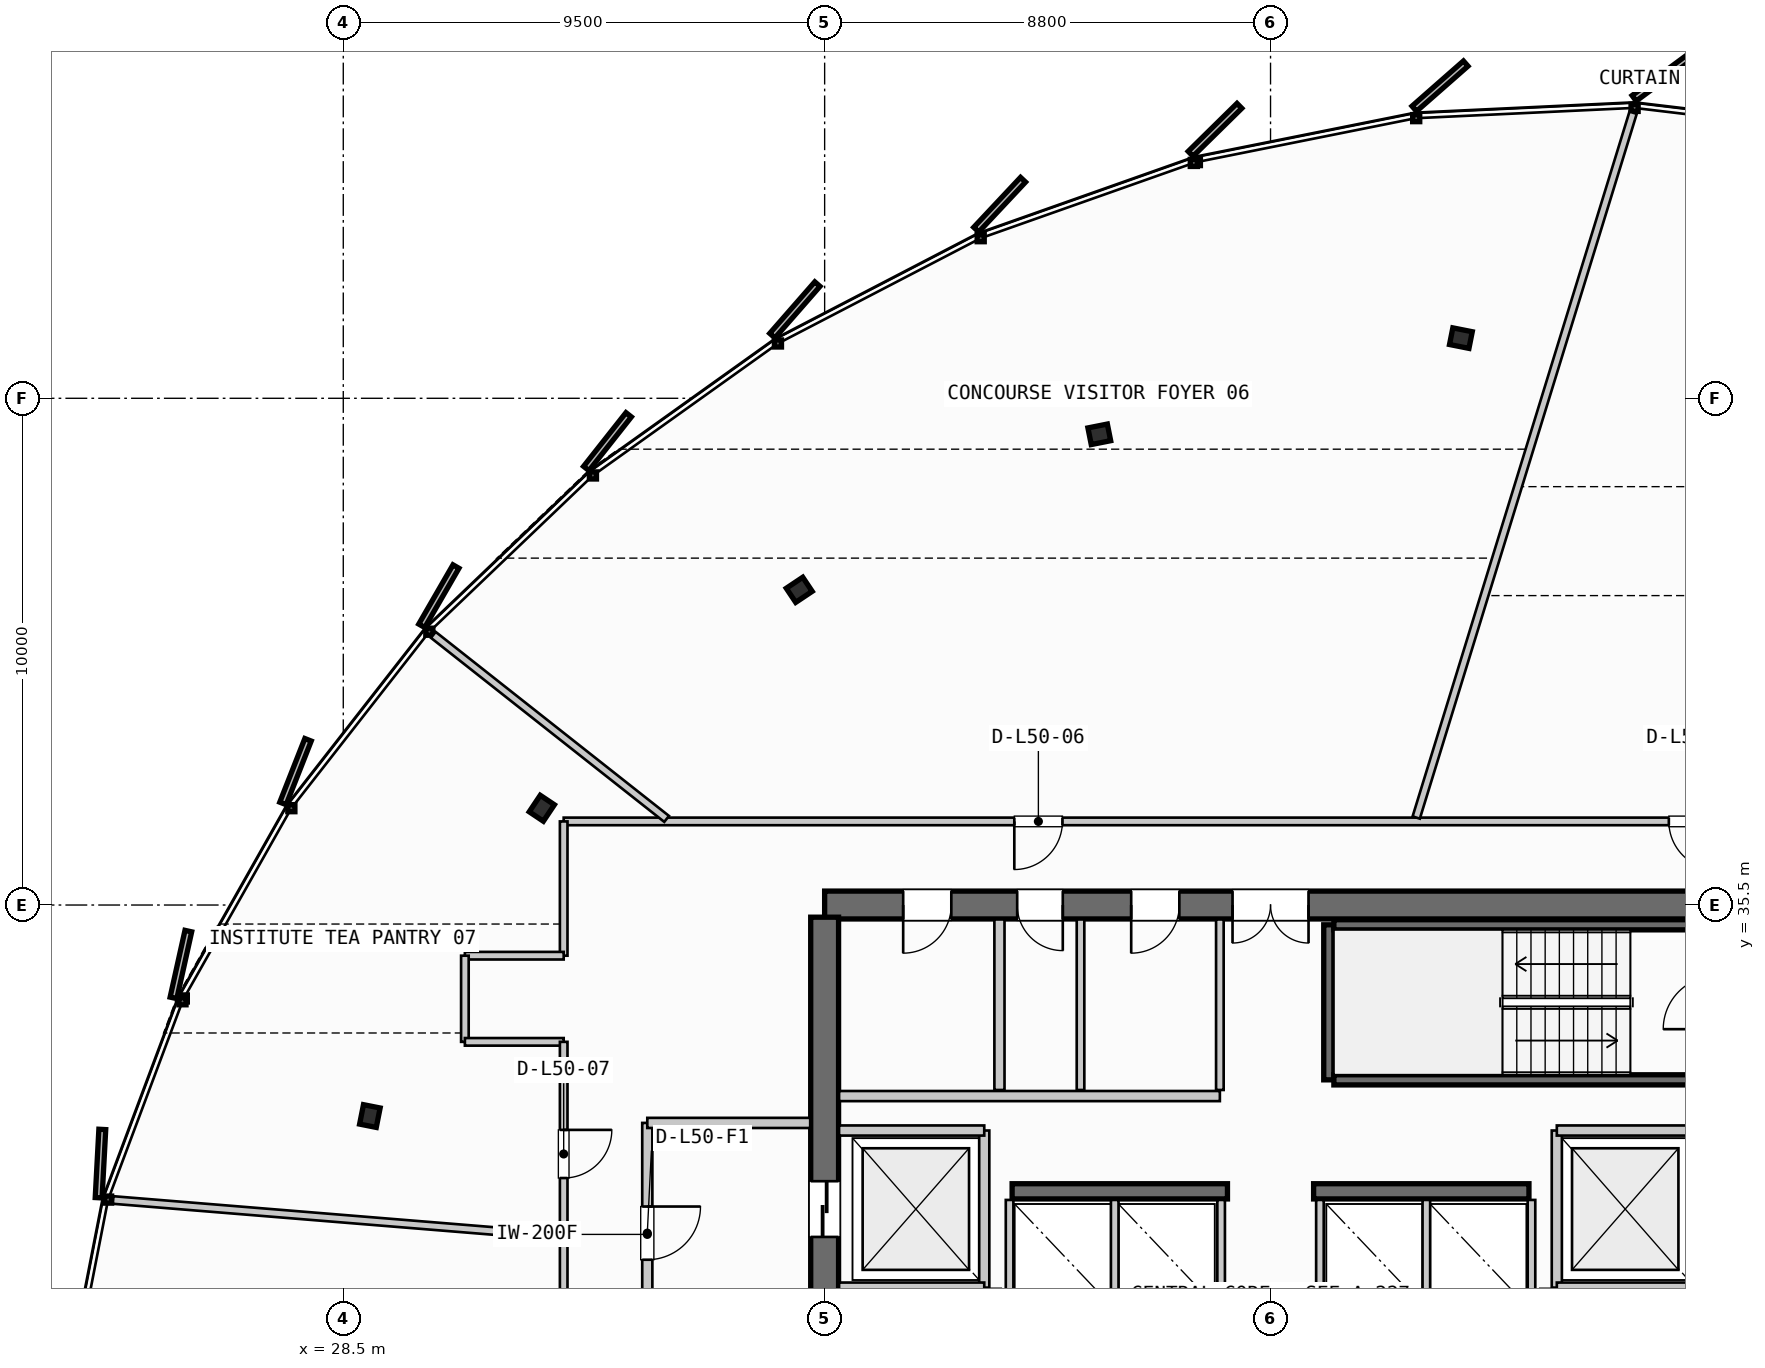
"""IFC4 building model, lengths in metres.
Left out: names, types, materials, properties, quantities, classifications, styles, units other than length and angle.
Written with IfcOpenShell. Run it as: python <this file> out.ifc"""

import sys

from ifc_helpers import new_model, si_unit, direction, frame, frame_2d, origin, origin_2d, place, context, subcontext, project, spatial, rectangle, i_section, extrude, source, transform, mapped, element, fill, save


model = new_model("IFC4")
c1 = context("Model", 3, precision=1e-05, world=origin(), true_north=direction((0.0, 1.0)))
c2 = subcontext(c1, "Body", "Model", "MODEL_VIEW")
j1 = project(units=[si_unit("LENGTHUNIT", "METRE"), si_unit("PLANEANGLEUNIT", "RADIAN")], contexts=[c1])
p1 = place(None, origin())
s1 = spatial("IfcSite", under=j1, at=p1, CompositionType="ELEMENT")
p2 = place(p1, origin())
s2 = spatial("IfcBuilding", under=s1, at=p2, CompositionType="ELEMENT")
p3 = place(p2, frame((0.0, 0.0, 193.9)))
s3 = spatial("IfcBuildingStorey", under=s2, at=p3, CompositionType="ELEMENT", Elevation=193.9)
p4 = place(p3, frame((55.6, 35.5, 0.0), z_axis=(0.0, 0.0, 1.0), x_axis=(-1.0, 0.0, 0.0)))
e1 = element("IfcWall", 1, at=p4, inside=s3, PredefinedType="SHEAR", context=c2, shape_type="SweptSolid", body=[
    extrude(rectangle(XDim=17.6, YDim=0.55, at=frame_2d((8.8, 0.0))), origin(), (0.0, 0.0, 1.0), 3.26),
])
p5 = place(p4, frame((8.05, 0.0, 0.0)))
e2 = element("IfcOpeningElement", 2, at=p5, cuts=e1, PredefinedType="OPENING", context=c2, shape_type="SweptSolid", body=[
    extrude(rectangle(XDim=1.5, YDim=2.2, at=frame_2d((0.75, 1.1))), frame((0.0, 0.285, 0.0), z_axis=(0.0, -1.0, 0.0), x_axis=(1.0, 0.0, 0.0)), (0.0, 0.0, 1.0), 0.57),
])
p6 = place(p4, frame((15.1, 0.0, 0.0)))
e3 = element("IfcOpeningElement", 3, at=p6, cuts=e1, PredefinedType="OPENING", context=c2, shape_type="SweptSolid", body=[
    extrude(rectangle(XDim=0.95, YDim=2.15, at=frame_2d((0.475, 1.075))), frame((0.0, 0.285, 0.0), z_axis=(0.0, -1.0, 0.0), x_axis=(1.0, 0.0, 0.0)), (0.0, 0.0, 1.0), 0.57),
])
p7 = place(p4, frame((12.9, 0.0, 0.0)))
e4 = element("IfcOpeningElement", 4, at=p7, cuts=e1, PredefinedType="OPENING", context=c2, shape_type="SweptSolid", body=[
    extrude(rectangle(XDim=0.9, YDim=2.15, at=frame_2d((0.45, 1.075))), frame((0.0, 0.285, 0.0), z_axis=(0.0, -1.0, 0.0), x_axis=(1.0, 0.0, 0.0)), (0.0, 0.0, 1.0), 0.57),
])
p8 = place(p4, frame((10.6, 0.0, 0.0)))
e5 = element("IfcOpeningElement", 5, at=p8, cuts=e1, PredefinedType="OPENING", context=c2, shape_type="SweptSolid", body=[
    extrude(rectangle(XDim=0.95, YDim=2.15, at=frame_2d((0.475, 1.075))), frame((0.0, 0.285, 0.0), z_axis=(0.0, -1.0, 0.0), x_axis=(1.0, 0.0, 0.0)), (0.0, 0.0, 1.0), 0.57),
])
p9 = place(p3, frame((38.0, 35.26, 0.0), z_axis=(0.0, 0.0, 1.0), x_axis=(0.0, -1.0, 0.0)))
e6 = element("IfcWall", 6, at=p9, inside=s3, PredefinedType="SHEAR", context=c2, shape_type="SweptSolid", body=[
    extrude(rectangle(XDim=14.92, YDim=0.55, at=frame_2d((7.46, 0.0))), origin(), (0.0, 0.0, 1.0), 3.26),
])
p10 = place(p9, frame((5.21, 0.0, 0.0)))
e7 = element("IfcOpeningElement", 7, at=p10, cuts=e6, PredefinedType="OPENING", context=c2, shape_type="SweptSolid", body=[
    extrude(rectangle(XDim=1.1, YDim=2.2, at=frame_2d((0.55, 1.1))), frame((0.0, 0.285, 0.0), z_axis=(0.0, -1.0, 0.0), x_axis=(1.0, 0.0, 0.0)), (0.0, 0.0, 1.0), 0.57),
])
for number, where, z_axis, x_axis in (
    (8, (41.7, 29.85, 0.0), (0.0, 0.0, 1.0), (1.0, 0.0, 0.0)),
    (9, (47.65, 29.85, 0.0), (0.0, 0.0, 1.0), (1.0, 0.0, 0.0)),
):
    element("IfcWall", number, at=place(p3, frame(where, z_axis=z_axis, x_axis=x_axis)), inside=s3, PredefinedType="SHEAR", context=c2, shape_type="SweptSolid", body=[
        extrude(rectangle(XDim=4.25, YDim=0.3, at=frame_2d((2.125, 0.0))), origin(), (0.0, 0.0, 1.0), 3.26),
    ])
m1 = source(origin(), c2, "Body", "SweptSolid", [
    extrude(i_section(OverallWidth=0.391, OverallDepth=0.335, WebThickness=0.023, FlangeThickness=0.034, FilletRadius=0.015, at=origin_2d()), origin(), (0.0, 0.0, 1.0), 3.26),
])
for number, where, z_axis, x_axis in (
    (10, (50.557, 46.688, 0.0), (0.0, 0.0, 1.0), (0.195, 0.981, 0.0)),
    (11, (43.421, 44.789, 0.0), (0.0, 0.0, 1.0), (-0.195, 0.981, 0.0)),
    (12, (37.499, 41.72, 0.0), (0.0, 0.0, 1.0), (-0.556, 0.831, 0.0)),
    (13, (32.418, 37.409, 0.0), (0.0, 0.0, 1.0), (-0.831, 0.556, 0.0)),
    (14, (29.025, 31.336, 0.0), (0.0, 0.0, 1.0), (-0.981, 0.195, 0.0)),
):
    element("IfcColumn", number, at=place(p3, frame(where, z_axis=z_axis, x_axis=x_axis)), inside=s3, PredefinedType="COLUMN", context=c2, shape_type="MappedRepresentation", body=[
        mapped(m1, transform((0.0, 0.0, 0.0), scale=1.0)),
    ])
p11 = place(p3, frame((47.95, 32.05, 0.0), z_axis=(0.0, 0.0, 1.0), x_axis=(0.0, 1.0, 0.0)))
e15 = element("IfcWall", 15, at=p11, inside=s3, PredefinedType="SHEAR", context=c2, shape_type="SweptSolid", body=[
    extrude(rectangle(XDim=3.06, YDim=0.2, at=frame_2d((1.53, 0.0))), origin(), (0.0, 0.0, 1.0), 3.26),
])
for number, where, z_axis, x_axis in (
    (16, (48.05, 35.11, 0.0), (0.0, 0.0, 1.0), (1.0, 0.0, 0.0)),
    (17, (55.4, 32.05, 0.0), (0.0, 0.0, 1.0), (-1.0, 0.0, 0.0)),
):
    element("IfcWall", number, at=place(p3, frame(where, z_axis=z_axis, x_axis=x_axis)), inside=s3, PredefinedType="SHEAR", context=c2, shape_type="SweptSolid", body=[
        extrude(rectangle(XDim=7.35, YDim=0.2, at=frame_2d((3.675, 0.0))), origin(), (0.0, 0.0, 1.0), 3.26),
    ])
p12 = place(p3, frame((41.15, 27.95, 0.0), z_axis=(0.0, 0.0, 1.0), x_axis=(0.0, 1.0, 0.0)))
e18 = element("IfcWall", 18, at=p12, inside=s3, PredefinedType="PARTITIONING", context=c2, shape_type="SweptSolid", body=[
    extrude(rectangle(XDim=3.1, YDim=0.2, at=frame_2d((1.55, 0.0))), origin(), (0.0, 0.0, 1.0), 2.735),
])
for number, where, z_axis, x_axis in (
    (19, (38.285, 27.95, 0.0), (0.0, 0.0, 1.0), (1.0, 0.0, 0.0)),
    (20, (38.285, 31.05, 0.0), (0.0, 0.0, 1.0), (1.0, 0.0, 0.0)),
):
    element("IfcWall", number, at=place(p3, frame(where, z_axis=z_axis, x_axis=x_axis)), inside=s3, PredefinedType="PARTITIONING", context=c2, shape_type="SweptSolid", body=[
        extrude(rectangle(XDim=2.865, YDim=0.2, at=frame_2d((1.433, 0.0))), origin(), (0.0, 0.0, 1.0), 2.735),
    ])
p13 = place(p3, frame((34.5, 31.2, 0.0), z_axis=(0.0, 0.0, 1.0), x_axis=(0.0, -1.0, 0.0)))
e21 = element("IfcWall", 21, at=p13, inside=s3, PredefinedType="PARTITIONING", context=c2, shape_type="SweptSolid", body=[
    extrude(rectangle(XDim=4.4, YDim=0.2, at=frame_2d((2.2, 0.0))), origin(), (0.0, 0.0, 1.0), 2.735),
])
p14 = place(p13, frame((1.65, 0.0, 0.0)))
e22 = element("IfcOpeningElement", 22, at=p14, cuts=e21, PredefinedType="OPENING", context=c2, shape_type="SweptSolid", body=[
    extrude(rectangle(XDim=1.05, YDim=2.15, at=frame_2d((0.525, 1.075))), frame((0.0, 0.11, 0.0), z_axis=(0.0, -1.0, 0.0), x_axis=(1.0, 0.0, 0.0)), (0.0, 0.0, 1.0), 0.22),
])
p15 = place(p3, frame((34.5, 31.2, 0.0), z_axis=(0.0, 0.0, 1.0), x_axis=(1.0, 0.0, 0.0)))
e23 = element("IfcWall", 23, at=p15, inside=s3, PredefinedType="PARTITIONING", context=c2, shape_type="SweptSolid", body=[
    extrude(rectangle(XDim=3.215, YDim=0.2, at=frame_2d((1.607, 0.0))), origin(), (0.0, 0.0, 1.0), 2.735),
])
p16 = place(p3, frame((52.45, 27.95, 0.0), z_axis=(0.0, 0.0, 1.0), x_axis=(0.0, 1.0, 0.0)))
e24 = element("IfcWall", 24, at=p16, inside=s3, PredefinedType="PARTITIONING", context=c2, shape_type="SweptSolid", body=[
    extrude(rectangle(XDim=3.1, YDim=0.2, at=frame_2d((1.55, 0.0))), origin(), (0.0, 0.0, 1.0), 2.735),
])
for number, where, z_axis, x_axis in (
    (25, (52.45, 27.95, 0.0), (0.0, 0.0, 1.0), (1.0, 0.0, 0.0)),
    (26, (52.45, 31.05, 0.0), (0.0, 0.0, 1.0), (1.0, 0.0, 0.0)),
):
    element("IfcWall", number, at=place(p3, frame(where, z_axis=z_axis, x_axis=x_axis)), inside=s3, PredefinedType="PARTITIONING", context=c2, shape_type="SweptSolid", body=[
        extrude(rectangle(XDim=2.865, YDim=0.2, at=frame_2d((1.433, 0.0))), origin(), (0.0, 0.0, 1.0), 2.735),
    ])
for number, where, z_axis, x_axis in (
    (27, (41.65, 27.41, 0.0), (0.0, 0.0, 1.0), (0.0, 1.0, 0.0)),
    (28, (43.725, 27.41, 0.0), (0.0, 0.0, 1.0), (0.0, 1.0, 0.0)),
    (29, (45.825, 27.41, 0.0), (0.0, 0.0, 1.0), (0.0, 1.0, 0.0)),
    (30, (47.775, 27.41, 0.0), (0.0, 0.0, 1.0), (0.0, 1.0, 0.0)),
    (31, (49.875, 27.41, 0.0), (0.0, 0.0, 1.0), (0.0, 1.0, 0.0)),
    (32, (51.95, 27.41, 0.0), (0.0, 0.0, 1.0), (0.0, 1.0, 0.0)),
):
    element("IfcWall", number, at=place(p3, frame(where, z_axis=z_axis, x_axis=x_axis)), inside=s3, PredefinedType="PARTITIONING", context=c2, shape_type="SweptSolid", body=[
        extrude(rectangle(XDim=2.27, YDim=0.15, at=frame_2d((1.135, 0.0))), origin(), (0.0, 0.0, 1.0), 2.735),
    ])
p17 = place(p3, frame((41.45, 31.85, 0.0), z_axis=(0.0, 0.0, 1.0), x_axis=(0.0, 1.0, 0.0)))
e33 = element("IfcWall", 33, at=p17, inside=s3, PredefinedType="PARTITIONING", context=c2, shape_type="SweptSolid", body=[
    extrude(rectangle(XDim=3.365, YDim=0.2, at=frame_2d((1.683, 0.0))), origin(), (0.0, 0.0, 1.0), 2.735),
])
p18 = place(p3, frame((38.285, 31.73, 0.0), z_axis=(0.0, 0.0, 1.0), x_axis=(1.0, 0.0, 0.0)))
e34 = element("IfcWall", 34, at=p18, inside=s3, PredefinedType="PARTITIONING", context=c2, shape_type="SweptSolid", body=[
    extrude(rectangle(XDim=7.515, YDim=0.2, at=frame_2d((3.758, 0.0))), origin(), (0.0, 0.0, 1.0), 2.735),
])
p19 = place(p3, frame((45.8, 31.85, 0.0), z_axis=(0.0, 0.0, 1.0), x_axis=(0.0, 1.0, 0.0)))
e35 = element("IfcWall", 35, at=p19, inside=s3, PredefinedType="PARTITIONING", context=c2, shape_type="SweptSolid", body=[
    extrude(rectangle(XDim=3.365, YDim=0.15, at=frame_2d((1.683, 0.0))), origin(), (0.0, 0.0, 1.0), 2.735),
])
p20 = place(p3, frame((43.05, 31.85, 0.0), z_axis=(0.0, 0.0, 1.0), x_axis=(0.0, 1.0, 0.0)))
e36 = element("IfcWall", 36, at=p20, inside=s3, PredefinedType="PLUMBINGWALL", context=c2, shape_type="SweptSolid", body=[
    extrude(rectangle(XDim=3.365, YDim=0.15, at=frame_2d((1.683, 0.0))), origin(), (0.0, 0.0, 1.0), 2.735),
])
p21 = place(p3, frame((61.2, 37.15, 0.0), z_axis=(0.0, 0.0, 1.0), x_axis=(-1.0, 0.0, 0.0)))
e37 = element("IfcWall", 37, at=p21, inside=s3, PredefinedType="PARTITIONING", context=c2, shape_type="SweptSolid", body=[
    extrude(rectangle(XDim=28.35, YDim=0.15, at=frame_2d((14.175, 0.0))), origin(), (0.0, 0.0, 1.0), 2.735),
])
p22 = place(p21, frame((5.589, 0.0, 0.0)))
e38 = element("IfcOpeningElement", 38, at=p22, cuts=e37, PredefinedType="OPENING", context=c2, shape_type="SweptSolid", body=[
    extrude(rectangle(XDim=0.95, YDim=2.15, at=frame_2d((0.475, 1.075))), frame((0.0, 0.085, 0.0), z_axis=(0.0, -1.0, 0.0), x_axis=(1.0, 0.0, 0.0)), (0.0, 0.0, 1.0), 0.17),
])
p23 = place(p21, frame((18.507, 0.0, 0.0)))
e39 = element("IfcOpeningElement", 39, at=p23, cuts=e37, PredefinedType="OPENING", context=c2, shape_type="SweptSolid", body=[
    extrude(rectangle(XDim=0.95, YDim=2.15, at=frame_2d((0.475, 1.075))), frame((0.0, 0.085, 0.0), z_axis=(0.0, -1.0, 0.0), x_axis=(1.0, 0.0, 0.0)), (0.0, 0.0, 1.0), 0.17),
])
p24 = place(p3, frame((32.85, 37.15, 0.0), z_axis=(0.0, 0.0, 1.0), x_axis=(0.0, -1.0, 0.0)))
e40 = element("IfcWall", 40, at=p24, inside=s3, PredefinedType="PARTITIONING", context=c2, shape_type="SweptSolid", body=[
    extrude(rectangle(XDim=2.65, YDim=0.15, at=frame_2d((1.325, 0.0))), origin(), (0.0, 0.0, 1.0), 2.735),
])
p25 = place(p3, frame((32.85, 34.5, 0.0), z_axis=(0.0, 0.0, 1.0), x_axis=(-1.0, 0.0, 0.0)))
e41 = element("IfcWall", 41, at=p25, inside=s3, PredefinedType="PARTITIONING", context=c2, shape_type="SweptSolid", body=[
    extrude(rectangle(XDim=1.95, YDim=0.15, at=frame_2d((0.975, 0.0))), origin(), (0.0, 0.0, 1.0), 2.735),
])
p26 = place(p3, frame((30.9, 34.5, 0.0), z_axis=(0.0, 0.0, 1.0), x_axis=(0.0, -1.0, 0.0)))
e42 = element("IfcWall", 42, at=p26, inside=s3, PredefinedType="PARTITIONING", context=c2, shape_type="SweptSolid", body=[
    extrude(rectangle(XDim=1.7, YDim=0.15, at=frame_2d((0.85, 0.0))), origin(), (0.0, 0.0, 1.0), 2.735),
])
p27 = place(p3, frame((30.9, 32.8, 0.0), z_axis=(0.0, 0.0, 1.0), x_axis=(1.0, 0.0, 0.0)))
e43 = element("IfcWall", 43, at=p27, inside=s3, PredefinedType="PARTITIONING", context=c2, shape_type="SweptSolid", body=[
    extrude(rectangle(XDim=1.95, YDim=0.15, at=frame_2d((0.975, 0.0))), origin(), (0.0, 0.0, 1.0), 2.735),
])
p28 = place(p3, frame((32.85, 32.8, 0.0), z_axis=(0.0, 0.0, 1.0), x_axis=(0.0, -1.0, 0.0)))
e44 = element("IfcWall", 44, at=p28, inside=s3, PredefinedType="PARTITIONING", context=c2, shape_type="SweptSolid", body=[
    extrude(rectangle(XDim=10.0, YDim=0.15, at=frame_2d((5.0, 0.0))), origin(), (0.0, 0.0, 1.0), 2.735),
])
p29 = place(p28, frame((1.738, 0.0, 0.0)))
e45 = element("IfcOpeningElement", 45, at=p29, cuts=e44, PredefinedType="OPENING", context=c2, shape_type="SweptSolid", body=[
    extrude(rectangle(XDim=0.95, YDim=2.15, at=frame_2d((0.475, 1.075))), frame((0.0, 0.085, 0.0), z_axis=(0.0, -1.0, 0.0), x_axis=(1.0, 0.0, 0.0)), (0.0, 0.0, 1.0), 0.17),
])
p30 = place(p28, frame((6.157, 0.0, 0.0)))
e46 = element("IfcOpeningElement", 46, at=p30, cuts=e44, PredefinedType="OPENING", context=c2, shape_type="SweptSolid", body=[
    extrude(rectangle(XDim=0.95, YDim=2.15, at=frame_2d((0.475, 1.075))), frame((0.0, 0.085, 0.0), z_axis=(0.0, -1.0, 0.0), x_axis=(1.0, 0.0, 0.0)), (0.0, 0.0, 1.0), 0.17),
])
p31 = place(p3, frame((49.675, 37.227, 0.0), z_axis=(0.0, 0.0, 1.0), x_axis=(0.294123572803, 0.955767400533, 0.0)))
e47 = element("IfcWall", 47, at=p31, inside=s3, PredefinedType="PARTITIONING", context=c2, shape_type="SweptSolid", body=[
    extrude(rectangle(XDim=14.553, YDim=0.15, at=frame_2d((7.276, 0.0))), origin(), (0.0, 0.0, 1.0), 2.735),
])
p32 = place(p3, frame((34.881, 37.199, 0.0), z_axis=(0.0, 0.0, 1.0), x_axis=(-0.785139524044, 0.619318922514, 0.0)))
e48 = element("IfcWall", 48, at=p32, inside=s3, PredefinedType="PARTITIONING", context=c2, shape_type="SweptSolid", body=[
    extrude(rectangle(XDim=5.864, YDim=0.15, at=frame_2d((2.932, 0.0))), origin(), (0.0, 0.0, 1.0), 2.735),
])
p33 = place(p3, frame((32.77, 28.961, 0.0), z_axis=(0.0, 0.0, 1.0), x_axis=(-0.996701457141, 0.081155439328, 0.0)))
e49 = element("IfcWall", 49, at=p33, inside=s3, PredefinedType="PARTITIONING", context=c2, shape_type="SweptSolid", body=[
    extrude(rectangle(XDim=8.841, YDim=0.15, at=frame_2d((4.421, 0.0))), origin(), (0.0, 0.0, 1.0), 2.735),
])
m2 = source(origin(), c2, "Body", "SweptSolid", [
    extrude(rectangle(XDim=1.5, YDim=2.2, at=frame_2d((0.75, 1.1))), frame((0.0, 0.025, 0.0), z_axis=(0.0, -1.0, 0.0), x_axis=(1.0, 0.0, 0.0)), (0.0, 0.0, 1.0), 0.05),
])
p34 = place(p5, origin())
e50 = element("IfcDoor", 50, at=p34, inside=s3, OperationType="DOUBLE_DOOR_SINGLE_SWING", PredefinedType="DOOR", context=c2, shape_type="MappedRepresentation", body=[
    mapped(m2, transform((0.0, 0.0, 0.0), scale=1.0)),
])
fill(e2, e50)
m3 = source(origin(), c2, "Body", "SweptSolid", [
    extrude(rectangle(XDim=1.1, YDim=2.2, at=frame_2d((0.55, 1.1))), frame((0.0, 0.025, 0.0), z_axis=(0.0, -1.0, 0.0), x_axis=(1.0, 0.0, 0.0)), (0.0, 0.0, 1.0), 0.05),
])
p35 = place(p10, origin())
e51 = element("IfcDoor", 51, at=p35, inside=s3, OperationType="SLIDING_TO_LEFT", PredefinedType="DOOR", context=c2, shape_type="MappedRepresentation", body=[
    mapped(m3, transform((0.0, 0.0, 0.0), scale=1.0)),
])
fill(e7, e51)
m4 = source(origin(), c2, "Body", "SweptSolid", [
    extrude(rectangle(XDim=0.95, YDim=2.15, at=frame_2d((0.475, 1.075))), frame((0.0, 0.025, 0.0), z_axis=(0.0, -1.0, 0.0), x_axis=(1.0, 0.0, 0.0)), (0.0, 0.0, 1.0), 0.05),
])
p36 = place(p6, origin())
e52 = element("IfcDoor", 52, at=p36, inside=s3, OperationType="SINGLE_SWING_RIGHT", PredefinedType="DOOR", context=c2, shape_type="MappedRepresentation", body=[
    mapped(m4, transform((0.0, 0.0, 0.0), scale=1.0)),
])
fill(e3, e52)
m5 = source(origin(), c2, "Body", "SweptSolid", [
    extrude(rectangle(XDim=0.9, YDim=2.15, at=frame_2d((0.45, 1.075))), frame((0.0, 0.025, 0.0), z_axis=(0.0, -1.0, 0.0), x_axis=(1.0, 0.0, 0.0)), (0.0, 0.0, 1.0), 0.05),
])
p37 = place(p7, origin())
e53 = element("IfcDoor", 53, at=p37, inside=s3, OperationType="SINGLE_SWING_LEFT", PredefinedType="DOOR", context=c2, shape_type="MappedRepresentation", body=[
    mapped(m5, transform((0.0, 0.0, 0.0), scale=1.0)),
])
fill(e4, e53)
p38 = place(p8, origin())
e54 = element("IfcDoor", 54, at=p38, inside=s3, OperationType="SINGLE_SWING_RIGHT", PredefinedType="DOOR", context=c2, shape_type="MappedRepresentation", body=[
    mapped(m4, transform((0.0, 0.0, 0.0), scale=1.0)),
])
fill(e5, e54)
m6 = source(origin(), c2, "Body", "SweptSolid", [
    extrude(rectangle(XDim=1.05, YDim=2.15, at=frame_2d((0.525, 1.075))), frame((0.0, 0.025, 0.0), z_axis=(0.0, -1.0, 0.0), x_axis=(1.0, 0.0, 0.0)), (0.0, 0.0, 1.0), 0.05),
])
p39 = place(p14, origin())
e55 = element("IfcDoor", 55, at=p39, inside=s3, OperationType="SINGLE_SWING_LEFT", PredefinedType="DOOR", context=c2, shape_type="MappedRepresentation", body=[
    mapped(m6, transform((0.0, 0.0, 0.0), scale=1.0)),
])
fill(e22, e55)
p40 = place(p22, origin())
e56 = element("IfcDoor", 56, at=p40, inside=s3, OperationType="SINGLE_SWING_LEFT", PredefinedType="DOOR", context=c2, shape_type="MappedRepresentation", body=[
    mapped(m4, transform((0.0, 0.0, 0.0), scale=1.0)),
])
fill(e38, e56)
p41 = place(p23, origin())
e57 = element("IfcDoor", 57, at=p41, inside=s3, OperationType="SINGLE_SWING_RIGHT", PredefinedType="DOOR", context=c2, shape_type="MappedRepresentation", body=[
    mapped(m4, transform((0.0, 0.0, 0.0), scale=1.0)),
])
fill(e39, e57)
p42 = place(p29, origin())
e58 = element("IfcDoor", 58, at=p42, inside=s3, OperationType="SINGLE_SWING_LEFT", PredefinedType="DOOR", context=c2, shape_type="MappedRepresentation", body=[
    mapped(m4, transform((0.0, 0.0, 0.0), scale=1.0)),
])
fill(e45, e58)
save(model, sys.argv[1])
